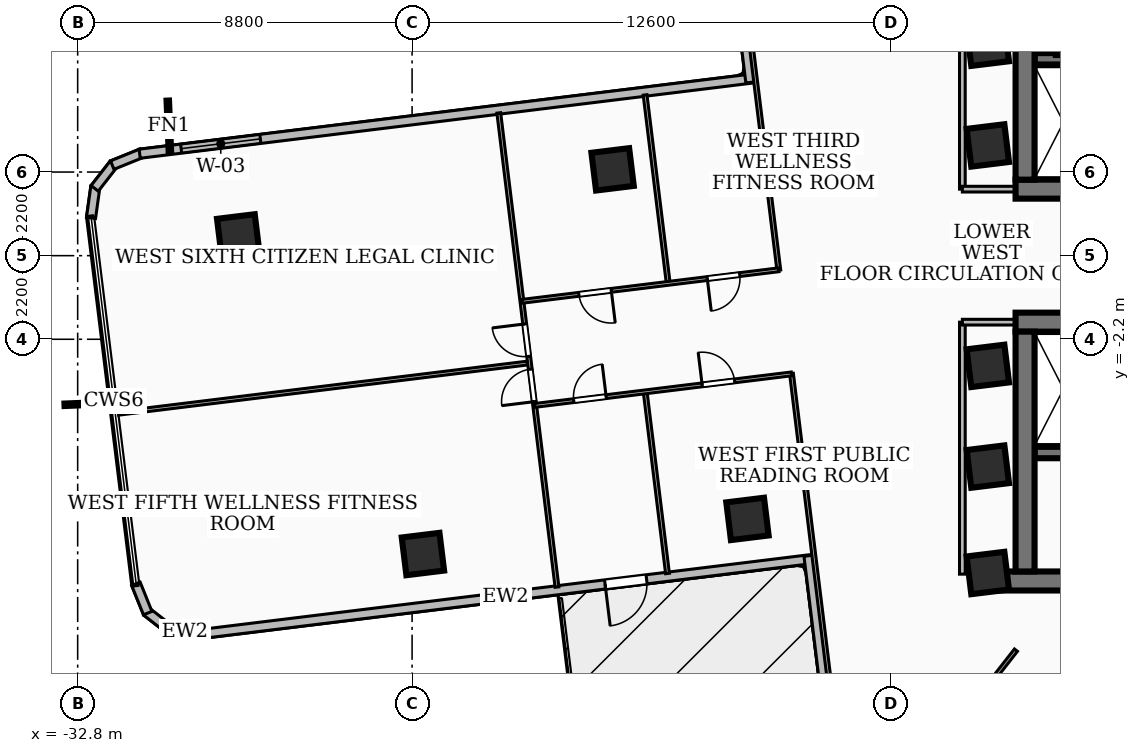
"""IFC4 building model, lengths in metres.
Left out: names, types, materials, properties, quantities, classifications, styles, units other than length and angle.
Written with IfcOpenShell. Run it as: python <this file> out.ifc"""

import sys

from ifc_helpers import new_model, si_unit, direction, frame, frame_2d, origin, origin_2d, place, context, subcontext, project, spatial, rectangle, extrude, element, fill, save


model = new_model("IFC4")
c1 = context("Model", 3, precision=1e-05, world=origin(), true_north=direction((0.0, 1.0)))
c2 = subcontext(c1, "Body", "Model", "MODEL_VIEW")
j1 = project(units=[si_unit("LENGTHUNIT", "METRE"), si_unit("PLANEANGLEUNIT", "RADIAN")], contexts=[c1])
p1 = place(None, origin())
s1 = spatial("IfcSite", under=j1, at=p1, CompositionType="ELEMENT")
p2 = place(p1, origin())
s2 = spatial("IfcBuilding", under=s1, at=p2, CompositionType="ELEMENT")
p3 = place(p2, frame((0.0, 0.0, 82.08)))
s3 = spatial("IfcBuildingStorey", under=s2, at=p3, CompositionType="ELEMENT", Elevation=82.08)
p4 = place(p3, frame((8.12, 1.75, 0.0), z_axis=(0.0, 0.0, 1.0), x_axis=(-1.0, 0.0, 0.0)))
e1 = element("IfcWall", 1, at=p4, inside=s3, PredefinedType="SHEAR", context=c2, shape_type="SweptSolid", body=[
    extrude(rectangle(XDim=16.24, YDim=0.5, at=frame_2d((8.12, 0.0))), origin(), (0.0, 0.0, 1.0), 3.34),
])
p5 = place(p4, frame((7.45, 0.0, 0.0)))
e2 = element("IfcOpeningElement", 2, at=p5, cuts=e1, PredefinedType="OPENING", context=c2, shape_type="SweptSolid", body=[
    extrude(rectangle(XDim=1.0, YDim=2.1, at=frame_2d((0.5, 1.05))), frame((0.0, 0.26, 0.0), z_axis=(0.0, -1.0, 0.0), x_axis=(1.0, 0.0, 0.0)), (0.0, 0.0, 1.0), 0.52),
])
p6 = place(p4, frame((3.85, 0.0, 0.0)))
e3 = element("IfcOpeningElement", 3, at=p6, cuts=e1, PredefinedType="OPENING", context=c2, shape_type="SweptSolid", body=[
    extrude(rectangle(XDim=0.9, YDim=2.06, at=frame_2d((0.45, 1.03))), frame((0.0, 0.26, 0.0), z_axis=(0.0, -1.0, 0.0), x_axis=(1.0, 0.0, 0.0)), (0.0, 0.0, 1.0), 0.52),
])
p7 = place(p4, frame((2.35, 0.0, 0.0)))
e4 = element("IfcOpeningElement", 4, at=p7, cuts=e1, PredefinedType="OPENING", context=c2, shape_type="SweptSolid", body=[
    extrude(rectangle(XDim=0.9, YDim=2.06, at=frame_2d((0.45, 1.03))), frame((0.0, 0.26, 0.0), z_axis=(0.0, -1.0, 0.0), x_axis=(1.0, 0.0, 0.0)), (0.0, 0.0, 1.0), 0.52),
])
p8 = place(p4, frame((0.8, 0.0, 0.0)))
e5 = element("IfcOpeningElement", 5, at=p8, cuts=e1, PredefinedType="OPENING", context=c2, shape_type="SweptSolid", body=[
    extrude(rectangle(XDim=0.9, YDim=2.06, at=frame_2d((0.45, 1.03))), frame((0.0, 0.26, 0.0), z_axis=(0.0, -1.0, 0.0), x_axis=(1.0, 0.0, 0.0)), (0.0, 0.0, 1.0), 0.52),
])
p9 = place(p3, frame((-7.87, 2.0, 0.0), z_axis=(0.0, 0.0, 1.0), x_axis=(0.0, 1.0, 0.0)))
e6 = element("IfcWall", 6, at=p9, inside=s3, PredefinedType="SHEAR", context=c2, shape_type="SweptSolid", body=[
    extrude(rectangle(XDim=6.31, YDim=0.5, at=frame_2d((3.155, 0.0))), origin(), (0.0, 0.0, 1.0), 3.34),
])
p10 = place(p3, frame((7.62, 5.18, 0.0), z_axis=(0.0, 0.0, 1.0), x_axis=(-1.0, 0.0, 0.0)))
e7 = element("IfcWall", 7, at=p10, inside=s3, PredefinedType="SOLIDWALL", context=c2, shape_type="SweptSolid", body=[
    extrude(rectangle(XDim=15.24, YDim=0.3, at=frame_2d((7.62, 0.0))), origin(), (0.0, 0.0, 1.0), 3.34),
])
p11 = place(p10, frame((5.77, 0.0, 0.0)))
e8 = element("IfcOpeningElement", 8, at=p11, cuts=e7, PredefinedType="OPENING", context=c2, shape_type="SweptSolid", body=[
    extrude(rectangle(XDim=1.1, YDim=2.15, at=frame_2d((0.55, 1.075))), frame((0.0, 0.16, 0.0), z_axis=(0.0, -1.0, 0.0), x_axis=(1.0, 0.0, 0.0)), (0.0, 0.0, 1.0), 0.32),
])
p12 = place(p10, frame((2.97, 0.0, 0.0)))
e9 = element("IfcOpeningElement", 9, at=p12, cuts=e7, PredefinedType="OPENING", context=c2, shape_type="SweptSolid", body=[
    extrude(rectangle(XDim=1.1, YDim=2.15, at=frame_2d((0.55, 1.075))), frame((0.0, 0.16, 0.0), z_axis=(0.0, -1.0, 0.0), x_axis=(1.0, 0.0, 0.0)), (0.0, 0.0, 1.0), 0.32),
])
p13 = place(p10, frame((7.97, 0.0, 0.0)))
e10 = element("IfcOpeningElement", 10, at=p13, cuts=e7, PredefinedType="OPENING", context=c2, shape_type="SweptSolid", body=[
    extrude(rectangle(XDim=1.0, YDim=2.1, at=frame_2d((0.5, 1.05))), frame((0.0, 0.16, 0.0), z_axis=(0.0, -1.0, 0.0), x_axis=(1.0, 0.0, 0.0)), (0.0, 0.0, 1.0), 0.32),
])
p14 = place(p3, frame((8.78, -8.56, 0.0), z_axis=(0.0, 0.0, 1.0), x_axis=(-1.0, 0.0, 0.0)))
e11 = element("IfcWall", 11, at=p14, inside=s3, PredefinedType="SHEAR", context=c2, shape_type="SweptSolid", body=[
    extrude(rectangle(XDim=17.56, YDim=0.5, at=frame_2d((8.78, 0.0))), origin(), (0.0, 0.0, 1.0), 3.34),
])
p15 = place(p3, frame((-8.12, -1.75, 0.0), z_axis=(0.0, 0.0, 1.0), x_axis=(1.0, 0.0, 0.0)))
e12 = element("IfcWall", 12, at=p15, inside=s3, PredefinedType="SHEAR", context=c2, shape_type="SweptSolid", body=[
    extrude(rectangle(XDim=16.24, YDim=0.5, at=frame_2d((8.12, 0.0))), origin(), (0.0, 0.0, 1.0), 3.34),
])
p16 = place(p15, frame((7.45, 0.0, 0.0)))
e13 = element("IfcOpeningElement", 13, at=p16, cuts=e12, PredefinedType="OPENING", context=c2, shape_type="SweptSolid", body=[
    extrude(rectangle(XDim=1.0, YDim=2.1, at=frame_2d((0.5, 1.05))), frame((0.0, 0.26, 0.0), z_axis=(0.0, -1.0, 0.0), x_axis=(1.0, 0.0, 0.0)), (0.0, 0.0, 1.0), 0.52),
])
p17 = place(p15, frame((10.965, 0.0, 0.0)))
e14 = element("IfcOpeningElement", 14, at=p17, cuts=e12, PredefinedType="OPENING", context=c2, shape_type="SweptSolid", body=[
    extrude(rectangle(XDim=1.05, YDim=2.15, at=frame_2d((0.525, 1.075))), frame((0.0, 0.26, 0.0), z_axis=(0.0, -1.0, 0.0), x_axis=(1.0, 0.0, 0.0)), (0.0, 0.0, 1.0), 0.52),
])
p18 = place(p15, frame((12.525, 0.0, 0.0)))
e15 = element("IfcOpeningElement", 15, at=p18, cuts=e12, PredefinedType="OPENING", context=c2, shape_type="SweptSolid", body=[
    extrude(rectangle(XDim=1.05, YDim=2.15, at=frame_2d((0.525, 1.075))), frame((0.0, 0.26, 0.0), z_axis=(0.0, -1.0, 0.0), x_axis=(1.0, 0.0, 0.0)), (0.0, 0.0, 1.0), 0.52),
])
p19 = place(p15, frame((14.085, 0.0, 0.0)))
e16 = element("IfcOpeningElement", 16, at=p19, cuts=e12, PredefinedType="OPENING", context=c2, shape_type="SweptSolid", body=[
    extrude(rectangle(XDim=1.05, YDim=2.15, at=frame_2d((0.525, 1.075))), frame((0.0, 0.26, 0.0), z_axis=(0.0, -1.0, 0.0), x_axis=(1.0, 0.0, 0.0)), (0.0, 0.0, 1.0), 0.52),
])
p20 = place(p3, frame((-7.87, -8.31, 0.0), z_axis=(0.0, 0.0, 1.0), x_axis=(0.0, 1.0, 0.0)))
e17 = element("IfcWall", 17, at=p20, inside=s3, PredefinedType="SHEAR", context=c2, shape_type="SweptSolid", body=[
    extrude(rectangle(XDim=6.31, YDim=0.5, at=frame_2d((3.155, 0.0))), origin(), (0.0, 0.0, 1.0), 3.34),
])
p21 = place(p3, frame((-7.62, -5.18, 0.0), z_axis=(0.0, 0.0, 1.0), x_axis=(1.0, 0.0, 0.0)))
e18 = element("IfcWall", 18, at=p21, inside=s3, PredefinedType="SOLIDWALL", context=c2, shape_type="SweptSolid", body=[
    extrude(rectangle(XDim=15.24, YDim=0.3, at=frame_2d((7.62, 0.0))), origin(), (0.0, 0.0, 1.0), 3.34),
])
p22 = place(p21, frame((5.77, 0.0, 0.0)))
e19 = element("IfcOpeningElement", 19, at=p22, cuts=e18, PredefinedType="OPENING", context=c2, shape_type="SweptSolid", body=[
    extrude(rectangle(XDim=1.1, YDim=2.15, at=frame_2d((0.55, 1.075))), frame((0.0, 0.16, 0.0), z_axis=(0.0, -1.0, 0.0), x_axis=(1.0, 0.0, 0.0)), (0.0, 0.0, 1.0), 0.32),
])
p23 = place(p21, frame((7.97, 0.0, 0.0)))
e20 = element("IfcOpeningElement", 20, at=p23, cuts=e18, PredefinedType="OPENING", context=c2, shape_type="SweptSolid", body=[
    extrude(rectangle(XDim=1.0, YDim=2.1, at=frame_2d((0.5, 1.05))), frame((0.0, 0.16, 0.0), z_axis=(0.0, -1.0, 0.0), x_axis=(1.0, 0.0, 0.0)), (0.0, 0.0, 1.0), 0.32),
])
p24 = place(p3, frame((-6.95, 5.28, 0.0), z_axis=(0.0, 0.0, 1.0), x_axis=(0.0, 1.0, 0.0)))
e21 = element("IfcWall", 21, at=p24, inside=s3, PredefinedType="SOLIDWALL", context=c2, shape_type="SweptSolid", body=[
    extrude(rectangle(XDim=3.06, YDim=0.22, at=frame_2d((1.53, 0.0))), origin(), (0.0, 0.0, 1.0), 3.34),
])
for number, where, z_axis, x_axis in (
    (22, (-8.85, -5.55, 0.0), (0.0, 0.0, 1.0), (0.993, 0.122, 0.0)),
    (23, (-8.85, -2.9, 0.0), (0.0, 0.0, 1.0), (0.993, 0.122, 0.0)),
    (24, (-8.85, 2.9, 0.0), (0.0, 0.0, 1.0), (0.993, 0.122, 0.0)),
    (25, (-8.85, 5.55, 0.0), (0.0, 0.0, 1.0), (0.993, 0.122, 0.0)),
    (26, (-8.85, -8.35, 0.0), (0.0, 0.0, 1.0), (0.993, 0.122, 0.0)),
    (27, (-18.724, 2.271, 0.0), (0.0, 0.0, 1.0), (0.993, 0.122, 0.0)),
    (28, (-15.175, -6.927, 0.0), (0.0, 0.0, 1.0), (0.993, 0.122, 0.0)),
    (29, (-28.576, 0.533, 0.0), (0.0, 0.0, 1.0), (0.993, 0.122, 0.0)),
    (30, (-23.715, -7.851, 0.0), (0.0, 0.0, 1.0), (0.993, 0.122, 0.0)),
):
    element("IfcColumn", number, at=place(p3, frame(where, z_axis=z_axis, x_axis=x_axis)), inside=s3, PredefinedType="COLUMN", context=c2, shape_type="SweptSolid", body=[
        extrude(rectangle(XDim=1.0, YDim=1.0, at=origin_2d()), origin(), (0.0, 0.0, 1.0), 3.6),
    ])
p25 = place(p3, frame((-13.462, -7.98, 0.0), z_axis=(0.0, 0.0, 1.0), x_axis=(-0.992550299081, -0.121835560463, 0.0)))
e31 = element("IfcWall", 31, at=p25, inside=s3, PredefinedType="SOLIDWALL", context=c2, shape_type="SweptSolid", body=[
    extrude(rectangle(XDim=16.275, YDim=0.24, at=frame_2d((8.138, 0.0))), origin(), (0.0, 0.0, 1.0), 3.34),
])
p26 = place(p25, frame((4.4, 0.0, 0.0)))
e32 = element("IfcOpeningElement", 32, at=p26, cuts=e31, PredefinedType="OPENING", context=c2, shape_type="SweptSolid", body=[
    extrude(rectangle(XDim=1.1, YDim=2.1, at=frame_2d((0.55, 1.05))), frame((0.0, 0.13, 0.0), z_axis=(0.0, -1.0, 0.0), x_axis=(1.0, 0.0, 0.0)), (0.0, 0.0, 1.0), 0.26),
])
p27 = place(p3, frame((-29.566, -9.963, 0.0), z_axis=(0.0, 0.0, 1.0), x_axis=(-0.990579937989, 0.136935701899, 0.0)))
e33 = element("IfcWall", 33, at=p27, inside=s3, PredefinedType="SOLIDWALL", context=c2, shape_type="SweptSolid", body=[
    extrude(rectangle(XDim=0.831, YDim=0.24, at=frame_2d((0.416, 0.0))), origin(), (0.0, 0.0, 1.0), 3.34),
])
p28 = place(p3, frame((-30.344, -9.867, 0.0), z_axis=(0.0, 0.0, 1.0), x_axis=(-0.788996702001, 0.614397431824, 0.0)))
e34 = element("IfcWall", 34, at=p28, inside=s3, PredefinedType="SOLIDWALL", context=c2, shape_type="SweptSolid", body=[
    extrude(rectangle(XDim=0.814, YDim=0.24, at=frame_2d((0.407, 0.0))), origin(), (0.0, 0.0, 1.0), 3.34),
])
for number, where, z_axis, x_axis in (
    (35, (-30.957, -9.405, 0.0), (0.0, 0.0, 1.0), (-0.374, 0.928, 0.0)),
    (36, (-32.449, 0.993, 0.0), (0.0, 0.0, 1.0), (0.139, 0.99, 0.0)),
):
    element("IfcWall", number, at=place(p3, frame(where, z_axis=z_axis, x_axis=x_axis)), inside=s3, PredefinedType="SOLIDWALL", context=c2, shape_type="SweptSolid", body=[
        extrude(rectangle(XDim=0.83, YDim=0.24, at=frame_2d((0.415, 0.0))), origin(), (0.0, 0.0, 1.0), 3.34),
    ])
p29 = place(p3, frame((-32.352, 1.77, 0.0), z_axis=(0.0, 0.0, 1.0), x_axis=(0.614397431824, 0.788996702001, 0.0)))
e37 = element("IfcWall", 37, at=p29, inside=s3, PredefinedType="SOLIDWALL", context=c2, shape_type="SweptSolid", body=[
    extrude(rectangle(XDim=0.814, YDim=0.24, at=frame_2d((0.407, 0.0))), origin(), (0.0, 0.0, 1.0), 3.34),
])
p30 = place(p3, frame((-31.89, 2.383, 0.0), z_axis=(0.0, 0.0, 1.0), x_axis=(0.927007742151, 0.375042192283, 0.0)))
e38 = element("IfcWall", 38, at=p30, inside=s3, PredefinedType="SOLIDWALL", context=c2, shape_type="SweptSolid", body=[
    extrude(rectangle(XDim=0.829, YDim=0.24, at=frame_2d((0.415, 0.0))), origin(), (0.0, 0.0, 1.0), 3.34),
])
p31 = place(p3, frame((-31.169, 2.682, 0.0), z_axis=(0.0, 0.0, 1.0), x_axis=(0.992548484973, 0.121850338438, 0.0)))
e39 = element("IfcWall", 39, at=p31, inside=s3, PredefinedType="SOLIDWALL", context=c2, shape_type="SweptSolid", body=[
    extrude(rectangle(XDim=16.275, YDim=0.24, at=frame_2d((8.138, 0.0))), origin(), (0.0, 0.0, 1.0), 3.34),
])
p32 = place(p31, frame((1.1, 0.0, 0.85)))
e40 = element("IfcOpeningElement", 40, at=p32, cuts=e39, PredefinedType="OPENING", context=c2, shape_type="SweptSolid", body=[
    extrude(rectangle(XDim=2.1, YDim=2.0, at=frame_2d((1.05, 1.0))), frame((0.0, 0.13, 0.0), z_axis=(0.0, -1.0, 0.0), x_axis=(1.0, 0.0, 0.0)), (0.0, 0.0, 1.0), 0.26),
])
p33 = place(p3, frame((-15.098, 4.558, 0.0), z_axis=(0.0, 0.0, 1.0), x_axis=(-0.121938646341, 0.992537639855, 0.0)))
e41 = element("IfcWall", 41, at=p33, inside=s3, PredefinedType="SOLIDWALL", context=c2, shape_type="SweptSolid", body=[
    extrude(rectangle(XDim=6.595, YDim=0.24, at=frame_2d((3.298, 0.0))), origin(), (0.0, 0.0, 1.0), 3.34),
])
p34 = place(p3, frame((-12.743, -14.621, 0.0), z_axis=(0.0, 0.0, 1.0), x_axis=(-0.121949848087, 0.992536263595, 0.0)))
e42 = element("IfcWall", 42, at=p34, inside=s3, PredefinedType="SOLIDWALL", context=c2, shape_type="SweptSolid", body=[
    extrude(rectangle(XDim=6.775, YDim=0.24, at=frame_2d((3.387, 0.0))), origin(), (0.0, 0.0, 1.0), 3.34),
])
p35 = place(p3, frame((-9.52, 1.75, 0.0), z_axis=(0.0, 0.0, 1.0), x_axis=(0.0, 1.0, 0.0)))
e43 = element("IfcWall", 43, at=p35, inside=s3, PredefinedType="PARTITIONING", context=c2, shape_type="SweptSolid", body=[
    extrude(rectangle(XDim=6.63, YDim=0.15, at=frame_2d((3.315, 0.0))), origin(), (0.0, 0.0, 1.0), 2.486),
])
p36 = place(p3, frame((-7.85, 1.75, 0.0), z_axis=(0.0, 0.0, 1.0), x_axis=(-1.0, 0.0, 0.0)))
e44 = element("IfcWall", 44, at=p36, inside=s3, PredefinedType="PARTITIONING", context=c2, shape_type="SweptSolid", body=[
    extrude(rectangle(XDim=1.67, YDim=0.15, at=frame_2d((0.835, 0.0))), origin(), (0.0, 0.0, 1.0), 2.405),
])
p37 = place(p3, frame((-9.52, -8.38, 0.0), z_axis=(0.0, 0.0, 1.0), x_axis=(0.0, 1.0, 0.0)))
e45 = element("IfcWall", 45, at=p37, inside=s3, PredefinedType="PARTITIONING", context=c2, shape_type="SweptSolid", body=[
    extrude(rectangle(XDim=6.63, YDim=0.15, at=frame_2d((3.315, 0.0))), origin(), (0.0, 0.0, 1.0), 2.486),
])
p38 = place(p3, frame((-7.85, -1.75, 0.0), z_axis=(0.0, 0.0, 1.0), x_axis=(-1.0, 0.0, 0.0)))
e46 = element("IfcWall", 46, at=p38, inside=s3, PredefinedType="PARTITIONING", context=c2, shape_type="SweptSolid", body=[
    extrude(rectangle(XDim=1.67, YDim=0.15, at=frame_2d((0.835, 0.0))), origin(), (0.0, 0.0, 1.0), 2.405),
])
p39 = place(p3, frame((-8.11, -10.38, 0.0), z_axis=(0.0, 0.0, 1.0), x_axis=(-0.615665236773, -0.788007814828, 0.0)))
e47 = element("IfcWall", 47, at=p39, inside=s3, PredefinedType="PARTITIONING", context=c2, shape_type="SweptSolid", body=[
    extrude(rectangle(XDim=6.482, YDim=0.1, at=frame_2d((3.241, 0.0))), origin(), (0.0, 0.0, 1.0), 3.34),
])
p40 = place(p3, frame((-14.017, -3.101, 0.0), z_axis=(0.0, 0.0, 1.0), x_axis=(0.122045971517, -0.992524448483, 0.0)))
e48 = element("IfcWall", 48, at=p40, inside=s3, PredefinedType="PARTITIONING", context=c2, shape_type="SweptSolid", body=[
    extrude(rectangle(XDim=8.13, YDim=0.1, at=frame_2d((4.065, 0.0))), origin(), (0.0, 0.0, 1.0), 2.486),
])
p41 = place(p3, frame((-15.32, 7.509, 0.0), z_axis=(0.0, 0.0, 1.0), x_axis=(0.122001160868, -0.992529957607, 0.0)))
e49 = element("IfcWall", 49, at=p41, inside=s3, PredefinedType="PARTITIONING", context=c2, shape_type="SweptSolid", body=[
    extrude(rectangle(XDim=7.95, YDim=0.1, at=frame_2d((3.975, 0.0))), origin(), (0.0, 0.0, 1.0), 2.486),
])
p42 = place(p3, frame((-17.864, -3.604, 0.0), z_axis=(0.0, 0.0, 1.0), x_axis=(0.121997782455, -0.992530372873, 0.0)))
e50 = element("IfcWall", 50, at=p42, inside=s3, PredefinedType="PARTITIONING", context=c2, shape_type="SweptSolid", body=[
    extrude(rectangle(XDim=4.795, YDim=0.1, at=frame_2d((2.397, 0.0))), origin(), (0.0, 0.0, 1.0), 2.486),
])
p43 = place(p3, frame((-17.869, 4.229, 0.0), z_axis=(0.0, 0.0, 1.0), x_axis=(0.121993075508, -0.992530951421, 0.0)))
e51 = element("IfcWall", 51, at=p43, inside=s3, PredefinedType="PARTITIONING", context=c2, shape_type="SweptSolid", body=[
    extrude(rectangle(XDim=4.975, YDim=0.1, at=frame_2d((2.488, 0.0))), origin(), (0.0, 0.0, 1.0), 2.486),
])
p44 = place(p3, frame((-20.775, -3.941, 0.0), z_axis=(0.0, 0.0, 1.0), x_axis=(0.992549540745, 0.121841738199, 0.0)))
e52 = element("IfcWall", 52, at=p44, inside=s3, PredefinedType="PARTITIONING", context=c2, shape_type="SweptSolid", body=[
    extrude(rectangle(XDim=6.811, YDim=0.1, at=frame_2d((3.405, 0.0))), origin(), (0.0, 0.0, 1.0), 3.34),
])
p45 = place(p44, frame((4.441, 0.0, 0.0)))
e53 = element("IfcOpeningElement", 53, at=p45, cuts=e52, PredefinedType="OPENING", context=c2, shape_type="SweptSolid", body=[
    extrude(rectangle(XDim=0.86, YDim=2.04, at=frame_2d((0.43, 1.02))), frame((0.0, 0.06, 0.0), z_axis=(0.0, -1.0, 0.0), x_axis=(1.0, 0.0, 0.0)), (0.0, 0.0, 1.0), 0.12),
])
p46 = place(p44, frame((1.036, 0.0, 0.0)))
e54 = element("IfcOpeningElement", 54, at=p46, cuts=e52, PredefinedType="OPENING", context=c2, shape_type="SweptSolid", body=[
    extrude(rectangle(XDim=0.86, YDim=2.04, at=frame_2d((0.43, 1.02))), frame((0.0, 0.06, 0.0), z_axis=(0.0, -1.0, 0.0), x_axis=(1.0, 0.0, 0.0)), (0.0, 0.0, 1.0), 0.12),
])
p47 = place(p3, frame((-14.352, -0.372, 0.0), z_axis=(0.0, 0.0, 1.0), x_axis=(-0.992547411675, -0.121859080812, 0.0)))
e55 = element("IfcWall", 55, at=p47, inside=s3, PredefinedType="PARTITIONING", context=c2, shape_type="SweptSolid", body=[
    extrude(rectangle(XDim=6.81, YDim=0.1, at=frame_2d((3.405, 0.0))), origin(), (0.0, 0.0, 1.0), 3.34),
])
p48 = place(p47, frame((1.035, 0.0, 0.0)))
e56 = element("IfcOpeningElement", 56, at=p48, cuts=e55, PredefinedType="OPENING", context=c2, shape_type="SweptSolid", body=[
    extrude(rectangle(XDim=0.86, YDim=2.04, at=frame_2d((0.43, 1.02))), frame((0.0, 0.06, 0.0), z_axis=(0.0, -1.0, 0.0), x_axis=(1.0, 0.0, 0.0)), (0.0, 0.0, 1.0), 0.12),
])
p49 = place(p47, frame((4.44, 0.0, 0.0)))
e57 = element("IfcOpeningElement", 57, at=p49, cuts=e55, PredefinedType="OPENING", context=c2, shape_type="SweptSolid", body=[
    extrude(rectangle(XDim=0.86, YDim=2.04, at=frame_2d((0.43, 1.02))), frame((0.0, 0.06, 0.0), z_axis=(0.0, -1.0, 0.0), x_axis=(1.0, 0.0, 0.0)), (0.0, 0.0, 1.0), 0.12),
])
p50 = place(p3, frame((-20.972, -2.827, 0.0), z_axis=(0.0, 0.0, 1.0), x_axis=(-0.992550340633, -0.121835221953, 0.0)))
e58 = element("IfcWall", 58, at=p50, inside=s3, PredefinedType="PARTITIONING", context=c2, shape_type="SweptSolid", body=[
    extrude(rectangle(XDim=10.835, YDim=0.1, at=frame_2d((5.417, 0.0))), origin(), (0.0, 0.0, 1.0), 2.793),
])
p51 = place(p3, frame((-20.187, -8.72, 0.0), z_axis=(0.0, 0.0, 1.0), x_axis=(-0.121878209661, 0.992545062962, 0.0)))
e59 = element("IfcWall", 59, at=p51, inside=s3, PredefinedType="PARTITIONING", context=c2, shape_type="SweptSolid", body=[
    extrude(rectangle(XDim=12.57, YDim=0.1, at=frame_2d((6.285, 0.0))), origin(), (0.0, 0.0, 1.0), 2.486),
])
p52 = place(p51, frame((6.115, 0.0, 0.0)))
e60 = element("IfcOpeningElement", 60, at=p52, cuts=e59, PredefinedType="OPENING", context=c2, shape_type="SweptSolid", body=[
    extrude(rectangle(XDim=0.86, YDim=2.04, at=frame_2d((0.43, 1.02))), frame((0.0, 0.06, 0.0), z_axis=(0.0, -1.0, 0.0), x_axis=(1.0, 0.0, 0.0)), (0.0, 0.0, 1.0), 0.12),
])
p53 = place(p51, frame((4.915, 0.0, 0.0)))
e61 = element("IfcOpeningElement", 61, at=p53, cuts=e59, PredefinedType="OPENING", context=c2, shape_type="SweptSolid", body=[
    extrude(rectangle(XDim=0.86, YDim=2.04, at=frame_2d((0.43, 1.02))), frame((0.0, 0.06, 0.0), z_axis=(0.0, -1.0, 0.0), x_axis=(1.0, 0.0, 0.0)), (0.0, 0.0, 1.0), 0.12),
])
p54 = place(p26, origin())
e62 = element("IfcDoor", 62, at=p54, inside=s3, OperationType="SINGLE_SWING_RIGHT", PredefinedType="DOOR", context=c2, shape_type="SweptSolid", body=[
    extrude(rectangle(XDim=1.1, YDim=2.1, at=frame_2d((0.55, 1.05))), frame((0.0, 0.025, 0.0), z_axis=(0.0, -1.0, 0.0), x_axis=(1.0, 0.0, 0.0)), (0.0, 0.0, 1.0), 0.05),
])
fill(e32, e62)
p55 = place(p32, origin())
e63 = element("IfcWindow", 63, at=p55, inside=s3, PartitioningType="SINGLE_PANEL", PredefinedType="WINDOW", context=c2, shape_type="SweptSolid", body=[
    extrude(rectangle(XDim=2.1, YDim=2.0, at=frame_2d((1.05, 1.0))), frame((0.0, 0.03, 0.0), z_axis=(0.0, -1.0, 0.0), x_axis=(1.0, 0.0, 0.0)), (0.0, 0.0, 1.0), 0.06),
])
fill(e40, e63)
p56 = place(p45, origin())
e64 = element("IfcDoor", 64, at=p56, inside=s3, OperationType="SINGLE_SWING_LEFT", PredefinedType="DOOR", context=c2, shape_type="SweptSolid", body=[
    extrude(rectangle(XDim=0.86, YDim=2.04, at=frame_2d((0.43, 1.02))), frame((0.0, 0.025, 0.0), z_axis=(0.0, -1.0, 0.0), x_axis=(1.0, 0.0, 0.0)), (0.0, 0.0, 1.0), 0.05),
])
fill(e53, e64)
p57 = place(p46, origin())
e65 = element("IfcDoor", 65, at=p57, inside=s3, OperationType="SINGLE_SWING_RIGHT", PredefinedType="DOOR", context=c2, shape_type="SweptSolid", body=[
    extrude(rectangle(XDim=0.86, YDim=2.04, at=frame_2d((0.43, 1.02))), frame((0.0, 0.025, 0.0), z_axis=(0.0, -1.0, 0.0), x_axis=(1.0, 0.0, 0.0)), (0.0, 0.0, 1.0), 0.05),
])
fill(e54, e65)
p58 = place(p48, origin())
e66 = element("IfcDoor", 66, at=p58, inside=s3, OperationType="SINGLE_SWING_RIGHT", PredefinedType="DOOR", context=c2, shape_type="SweptSolid", body=[
    extrude(rectangle(XDim=0.86, YDim=2.04, at=frame_2d((0.43, 1.02))), frame((0.0, 0.025, 0.0), z_axis=(0.0, -1.0, 0.0), x_axis=(1.0, 0.0, 0.0)), (0.0, 0.0, 1.0), 0.05),
])
fill(e56, e66)
p59 = place(p49, origin())
e67 = element("IfcDoor", 67, at=p59, inside=s3, OperationType="SINGLE_SWING_LEFT", PredefinedType="DOOR", context=c2, shape_type="SweptSolid", body=[
    extrude(rectangle(XDim=0.86, YDim=2.04, at=frame_2d((0.43, 1.02))), frame((0.0, 0.025, 0.0), z_axis=(0.0, -1.0, 0.0), x_axis=(1.0, 0.0, 0.0)), (0.0, 0.0, 1.0), 0.05),
])
fill(e57, e67)
p60 = place(p52, origin())
e68 = element("IfcDoor", 68, at=p60, inside=s3, OperationType="SINGLE_SWING_RIGHT", PredefinedType="DOOR", context=c2, shape_type="SweptSolid", body=[
    extrude(rectangle(XDim=0.86, YDim=2.04, at=frame_2d((0.43, 1.02))), frame((0.0, 0.025, 0.0), z_axis=(0.0, -1.0, 0.0), x_axis=(1.0, 0.0, 0.0)), (0.0, 0.0, 1.0), 0.05),
])
fill(e60, e68)
p61 = place(p53, origin())
e69 = element("IfcDoor", 69, at=p61, inside=s3, OperationType="SINGLE_SWING_LEFT", PredefinedType="DOOR", context=c2, shape_type="SweptSolid", body=[
    extrude(rectangle(XDim=0.86, YDim=2.04, at=frame_2d((0.43, 1.02))), frame((0.0, 0.025, 0.0), z_axis=(0.0, -1.0, 0.0), x_axis=(1.0, 0.0, 0.0)), (0.0, 0.0, 1.0), 0.05),
])
fill(e61, e69)
save(model, sys.argv[1])
